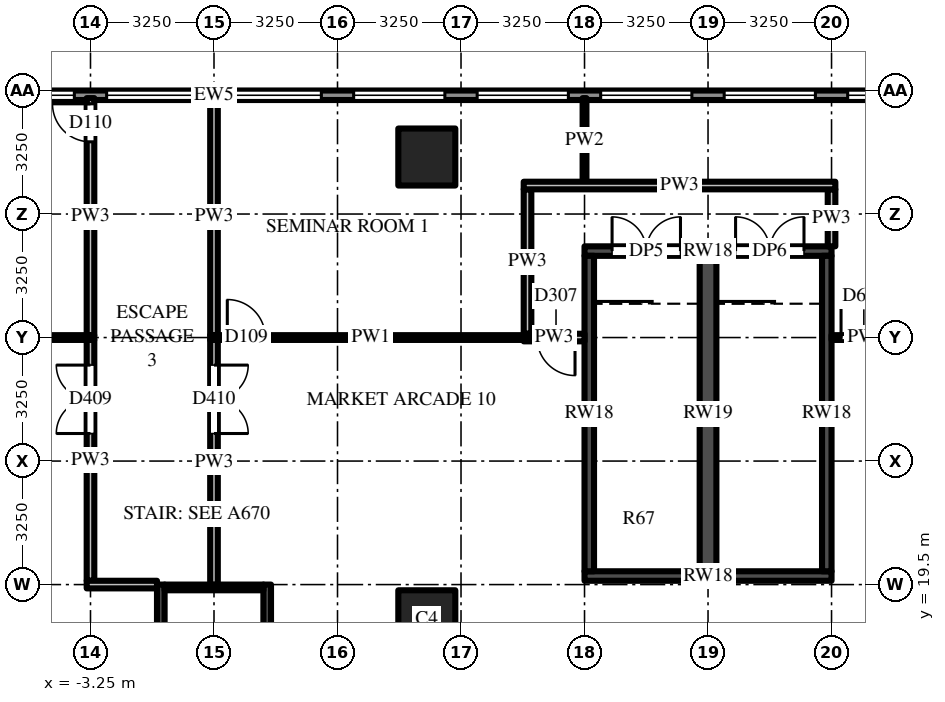
"""IFC4 building model, lengths in metres.
Left out: names, types, materials, properties, quantities, classifications, styles, units other than length and angle.
Written with IfcOpenShell. Run it as: python <this file> out.ifc"""

import sys

from ifc_helpers import new_model, si_unit, direction, frame, frame_2d, origin, origin_2d, place, context, subcontext, project, spatial, rectangle, extrude, source, transform, mapped, element, fill, save


model = new_model("IFC4")
c1 = context("Model", 3, precision=1e-05, world=origin(), true_north=direction((0.0, 1.0)))
c2 = subcontext(c1, "Body", "Model", "MODEL_VIEW")
j1 = project(units=[si_unit("LENGTHUNIT", "METRE"), si_unit("PLANEANGLEUNIT", "RADIAN")], contexts=[c1])
p1 = place(None, origin())
s1 = spatial("IfcSite", under=j1, at=p1, CompositionType="ELEMENT")
p2 = place(p1, origin())
s2 = spatial("IfcBuilding", under=s1, at=p2, CompositionType="ELEMENT")
p3 = place(p2, frame((0.0, 0.0, 29.0)))
s3 = spatial("IfcBuildingStorey", under=s2, at=p3, CompositionType="ELEMENT", Elevation=29.0)
m1 = source(origin(), c2, "Body", "SweptSolid", [
    extrude(rectangle(XDim=1.5, YDim=1.5, at=origin_2d()), origin(), (0.0, 0.0, 1.0), 5.0),
])
for number, where, z_axis, x_axis in (
    (1, (5.6, 18.6, 0.0), (0.0, 0.0, 1.0), (1.0, 0.0, 0.0)),
    (2, (5.6, 30.75, 0.0), (0.0, 0.0, 1.0), (1.0, 0.0, 0.0)),
):
    element("IfcColumn", number, at=place(p3, frame(where, z_axis=z_axis, x_axis=x_axis)), inside=s3, PredefinedType="COLUMN", context=c2, shape_type="MappedRepresentation", body=[
        mapped(m1, transform((0.0, 0.0, 0.0))),
    ])
m2 = source(origin(), c2, "Body", "SweptSolid", [
    extrude(rectangle(XDim=6.0, YDim=0.2, at=frame_2d((3.0, 0.0))), origin(), (0.0, 0.0, 1.0), 4.65),
])
for number, where, z_axis, x_axis in (
    (3, (-1.4, 13.5, 0.0), (0.0, 0.0, 1.0), (0.0, 1.0, 0.0)),
    (4, (1.4, 13.5, 0.0), (0.0, 0.0, 1.0), (0.0, 1.0, 0.0)),
):
    element("IfcWall", number, at=place(p3, frame(where, z_axis=z_axis, x_axis=x_axis)), inside=s3, PredefinedType="SHEAR", context=c2, shape_type="MappedRepresentation", body=[
        mapped(m2, transform((0.0, 0.0, 0.0))),
    ])
m3 = source(origin(), c2, "Body", "SweptSolid", [
    extrude(rectangle(XDim=2.6, YDim=0.15, at=frame_2d((1.3, 0.0))), origin(), (0.0, 0.0, 1.0), 4.65),
])
p4 = place(p3, frame((-1.3, 19.425, 0.0), z_axis=(0.0, 0.0, 1.0), x_axis=(1.0, 0.0, 0.0)))
e5 = element("IfcWall", 5, at=p4, inside=s3, PredefinedType="SHEAR", context=c2, shape_type="MappedRepresentation", body=[
    mapped(m3, transform((0.0, 0.0, 0.0))),
])
m4 = source(origin(), c2, "Body", "SweptSolid", [
    extrude(rectangle(XDim=6.5, YDim=0.25, at=frame_2d((3.25, 0.0))), origin(), (0.0, 0.0, 1.0), 4.65),
])
p5 = place(p3, frame((9.75, 28.275, 0.0), z_axis=(0.0, 0.0, 1.0), x_axis=(1.0, 0.0, 0.0)))
e6 = element("IfcWall", 6, at=p5, inside=s3, PredefinedType="SHEAR", context=c2, shape_type="MappedRepresentation", body=[
    mapped(m4, transform((0.0, 0.0, 0.0))),
])
m5 = source(origin(), c2, "Body", "SweptSolid", [
    extrude(rectangle(XDim=1.8, YDim=2.1, at=frame_2d((0.9, 1.05))), frame((0.0, 0.135, 0.0), z_axis=(0.0, -1.0, 0.0), x_axis=(1.0, 0.0, 0.0)), (0.0, 0.0, 1.0), 0.27),
])
p6 = place(p5, frame((0.725, 0.0, 0.0)))
e7 = element("IfcOpeningElement", 7, at=p6, cuts=e6, PredefinedType="OPENING", context=c2, shape_type="MappedRepresentation", body=[
    mapped(m5, transform((0.0, 0.0, 0.0))),
])
p7 = place(p5, frame((3.975, 0.0, 0.0)))
e8 = element("IfcOpeningElement", 8, at=p7, cuts=e6, PredefinedType="OPENING", context=c2, shape_type="MappedRepresentation", body=[
    mapped(m5, transform((0.0, 0.0, 0.0))),
])
p8 = place(p3, frame((9.75, 19.725, 0.0), z_axis=(0.0, 0.0, 1.0), x_axis=(1.0, 0.0, 0.0)))
e9 = element("IfcWall", 9, at=p8, inside=s3, PredefinedType="SHEAR", context=c2, shape_type="MappedRepresentation", body=[
    mapped(m4, transform((0.0, 0.0, 0.0))),
])
m6 = source(origin(), c2, "Body", "SweptSolid", [
    extrude(rectangle(XDim=8.3, YDim=0.25, at=frame_2d((4.15, 0.0))), origin(), (0.0, 0.0, 1.0), 4.65),
])
for number, where, z_axis, x_axis in (
    (10, (9.875, 19.85, 0.0), (0.0, 0.0, 1.0), (0.0, 1.0, 0.0)),
    (11, (16.125, 19.85, 0.0), (0.0, 0.0, 1.0), (0.0, 1.0, 0.0)),
):
    element("IfcWall", number, at=place(p3, frame(where, z_axis=z_axis, x_axis=x_axis)), inside=s3, PredefinedType="SHEAR", context=c2, shape_type="MappedRepresentation", body=[
        mapped(m6, transform((0.0, 0.0, 0.0))),
    ])
m7 = source(origin(), c2, "Body", "SweptSolid", [
    extrude(rectangle(XDim=8.3, YDim=0.44, at=frame_2d((4.15, 0.0))), origin(), (0.0, 0.0, 1.0), 4.65),
])
p9 = place(p3, frame((13.0, 19.85, 0.0), z_axis=(0.0, 0.0, 1.0), x_axis=(0.0, 1.0, 0.0)))
e12 = element("IfcWall", 12, at=p9, inside=s3, PredefinedType="SHEAR", context=c2, shape_type="MappedRepresentation", body=[
    mapped(m7, transform((0.0, 0.0, 0.0))),
])
m8 = source(origin(), c2, "Body", "SweptSolid", [
    extrude(rectangle(XDim=58.5, YDim=0.25, at=frame_2d((29.25, 0.0))), origin(), (0.0, 0.0, 1.0), 4.65),
])
p10 = place(p3, frame((29.25, 32.375, 0.0), z_axis=(0.0, 0.0, 1.0), x_axis=(-1.0, 0.0, 0.0)))
e13 = element("IfcWall", 13, at=p10, inside=s3, PredefinedType="SOLIDWALL", context=c2, shape_type="MappedRepresentation", body=[
    mapped(m8, transform((0.0, 0.0, 0.0))),
])
m9 = source(origin(), c2, "Body", "SweptSolid", [
    extrude(rectangle(XDim=2.4, YDim=3.3, at=frame_2d((1.2, 1.65))), frame((0.0, 0.135, 0.0), z_axis=(0.0, -1.0, 0.0), x_axis=(1.0, 0.0, 0.0)), (0.0, 0.0, 1.0), 0.27),
])
p11 = place(p10, frame((0.425, 0.0, 0.6)))
e14 = element("IfcOpeningElement", 14, at=p11, cuts=e13, PredefinedType="OPENING", context=c2, shape_type="MappedRepresentation", body=[
    mapped(m9, transform((0.0, 0.0, 0.0))),
])
p12 = place(p10, frame((3.675, 0.0, 0.6)))
e15 = element("IfcOpeningElement", 15, at=p12, cuts=e13, PredefinedType="OPENING", context=c2, shape_type="MappedRepresentation", body=[
    mapped(m9, transform((0.0, 0.0, 0.0))),
])
p13 = place(p10, frame((6.925, 0.0, 0.6)))
e16 = element("IfcOpeningElement", 16, at=p13, cuts=e13, PredefinedType="OPENING", context=c2, shape_type="MappedRepresentation", body=[
    mapped(m9, transform((0.0, 0.0, 0.0))),
])
p14 = place(p10, frame((10.175, 0.0, 0.6)))
e17 = element("IfcOpeningElement", 17, at=p14, cuts=e13, PredefinedType="OPENING", context=c2, shape_type="MappedRepresentation", body=[
    mapped(m9, transform((0.0, 0.0, 0.0))),
])
p15 = place(p10, frame((13.425, 0.0, 0.6)))
e18 = element("IfcOpeningElement", 18, at=p15, cuts=e13, PredefinedType="OPENING", context=c2, shape_type="MappedRepresentation", body=[
    mapped(m9, transform((0.0, 0.0, 0.0))),
])
p16 = place(p10, frame((16.675, 0.0, 0.6)))
e19 = element("IfcOpeningElement", 19, at=p16, cuts=e13, PredefinedType="OPENING", context=c2, shape_type="MappedRepresentation", body=[
    mapped(m9, transform((0.0, 0.0, 0.0))),
])
p17 = place(p10, frame((19.925, 0.0, 0.6)))
e20 = element("IfcOpeningElement", 20, at=p17, cuts=e13, PredefinedType="OPENING", context=c2, shape_type="MappedRepresentation", body=[
    mapped(m9, transform((0.0, 0.0, 0.0))),
])
p18 = place(p10, frame((23.175, 0.0, 0.6)))
e21 = element("IfcOpeningElement", 21, at=p18, cuts=e13, PredefinedType="OPENING", context=c2, shape_type="MappedRepresentation", body=[
    mapped(m9, transform((0.0, 0.0, 0.0))),
])
p19 = place(p10, frame((26.425, 0.0, 0.6)))
e22 = element("IfcOpeningElement", 22, at=p19, cuts=e13, PredefinedType="OPENING", context=c2, shape_type="MappedRepresentation", body=[
    mapped(m9, transform((0.0, 0.0, 0.0))),
])
p20 = place(p10, frame((29.675, 0.0, 0.6)))
e23 = element("IfcOpeningElement", 23, at=p20, cuts=e13, PredefinedType="OPENING", context=c2, shape_type="MappedRepresentation", body=[
    mapped(m9, transform((0.0, 0.0, 0.0))),
])
p21 = place(p10, frame((32.925, 0.0, 0.6)))
e24 = element("IfcOpeningElement", 24, at=p21, cuts=e13, PredefinedType="OPENING", context=c2, shape_type="MappedRepresentation", body=[
    mapped(m9, transform((0.0, 0.0, 0.0))),
])
p22 = place(p10, frame((36.175, 0.0, 0.6)))
e25 = element("IfcOpeningElement", 25, at=p22, cuts=e13, PredefinedType="OPENING", context=c2, shape_type="MappedRepresentation", body=[
    mapped(m9, transform((0.0, 0.0, 0.0))),
])
p23 = place(p10, frame((39.425, 0.0, 0.6)))
e26 = element("IfcOpeningElement", 26, at=p23, cuts=e13, PredefinedType="OPENING", context=c2, shape_type="MappedRepresentation", body=[
    mapped(m9, transform((0.0, 0.0, 0.0))),
])
p24 = place(p10, frame((42.675, 0.0, 0.6)))
e27 = element("IfcOpeningElement", 27, at=p24, cuts=e13, PredefinedType="OPENING", context=c2, shape_type="MappedRepresentation", body=[
    mapped(m9, transform((0.0, 0.0, 0.0))),
])
p25 = place(p10, frame((45.925, 0.0, 0.6)))
e28 = element("IfcOpeningElement", 28, at=p25, cuts=e13, PredefinedType="OPENING", context=c2, shape_type="MappedRepresentation", body=[
    mapped(m9, transform((0.0, 0.0, 0.0))),
])
p26 = place(p10, frame((49.175, 0.0, 0.6)))
e29 = element("IfcOpeningElement", 29, at=p26, cuts=e13, PredefinedType="OPENING", context=c2, shape_type="MappedRepresentation", body=[
    mapped(m9, transform((0.0, 0.0, 0.0))),
])
p27 = place(p10, frame((52.425, 0.0, 0.6)))
e30 = element("IfcOpeningElement", 30, at=p27, cuts=e13, PredefinedType="OPENING", context=c2, shape_type="MappedRepresentation", body=[
    mapped(m9, transform((0.0, 0.0, 0.0))),
])
p28 = place(p10, frame((55.675, 0.0, 0.6)))
e31 = element("IfcOpeningElement", 31, at=p28, cuts=e13, PredefinedType="OPENING", context=c2, shape_type="MappedRepresentation", body=[
    mapped(m9, transform((0.0, 0.0, 0.0))),
])
m10 = source(origin(), c2, "Body", "SweptSolid", [
    extrude(rectangle(XDim=3.188, YDim=0.2, at=frame_2d((1.594, 0.0))), origin(), (0.0, 0.0, 1.0), 4.65),
])
p29 = place(p3, frame((-3.25, 22.75, 0.0), z_axis=(0.0, 0.0, 1.0), x_axis=(0.0, 1.0, 0.0)))
e32 = element("IfcWall", 32, at=p29, inside=s3, PredefinedType="PARTITIONING", context=c2, shape_type="MappedRepresentation", body=[
    mapped(m10, transform((0.0, 0.0, 0.0))),
])
m11 = source(origin(), c2, "Body", "SweptSolid", [
    extrude(rectangle(XDim=1.8, YDim=2.1, at=frame_2d((0.9, 1.05))), frame((0.0, 0.11, 0.0), z_axis=(0.0, -1.0, 0.0), x_axis=(1.0, 0.0, 0.0)), (0.0, 0.0, 1.0), 0.22),
])
p30 = place(p29, frame((0.725, 0.0, 0.0)))
e33 = element("IfcOpeningElement", 33, at=p30, cuts=e32, PredefinedType="OPENING", context=c2, shape_type="MappedRepresentation", body=[
    mapped(m11, transform((0.0, 0.0, 0.0))),
])
m12 = source(origin(), c2, "Body", "SweptSolid", [
    extrude(rectangle(XDim=3.15, YDim=0.2, at=frame_2d((1.575, 0.0))), origin(), (0.0, 0.0, 1.0), 4.65),
])
p31 = place(p3, frame((-3.25, 19.6, 0.0), z_axis=(0.0, 0.0, 1.0), x_axis=(0.0, 1.0, 0.0)))
e34 = element("IfcWall", 34, at=p31, inside=s3, PredefinedType="PARTITIONING", context=c2, shape_type="MappedRepresentation", body=[
    mapped(m12, transform((0.0, 0.0, 0.0))),
])
m13 = source(origin(), c2, "Body", "SweptSolid", [
    extrude(rectangle(XDim=6.238, YDim=0.2, at=frame_2d((3.119, 0.0))), origin(), (0.0, 0.0, 1.0), 3.73),
])
p32 = place(p3, frame((-3.25, 26.062, 0.0), z_axis=(0.0, 0.0, 1.0), x_axis=(0.0, 1.0, 0.0)))
e35 = element("IfcWall", 35, at=p32, inside=s3, PredefinedType="PARTITIONING", context=c2, shape_type="MappedRepresentation", body=[
    mapped(m13, transform((0.0, 0.0, 0.0))),
])
m14 = source(origin(), c2, "Body", "SweptSolid", [
    extrude(rectangle(XDim=1.0, YDim=2.1, at=frame_2d((0.5, 1.05))), frame((0.0, 0.11, 0.0), z_axis=(0.0, -1.0, 0.0), x_axis=(1.0, 0.0, 0.0)), (0.0, 0.0, 1.0), 0.22),
])
p33 = place(p32, frame((5.087, 0.0, 0.0)))
e36 = element("IfcOpeningElement", 36, at=p33, cuts=e35, PredefinedType="OPENING", context=c2, shape_type="MappedRepresentation", body=[
    mapped(m14, transform((0.0, 0.0, 0.0))),
])
m15 = source(origin(), c2, "Body", "SweptSolid", [
    extrude(rectangle(XDim=3.188, YDim=0.2, at=frame_2d((1.594, 0.0))), origin(), (0.0, 0.0, 1.0), 3.947),
])
p34 = place(p3, frame((0.0, 25.938, 0.0), z_axis=(0.0, 0.0, 1.0), x_axis=(0.0, -1.0, 0.0)))
e37 = element("IfcWall", 37, at=p34, inside=s3, PredefinedType="PARTITIONING", context=c2, shape_type="MappedRepresentation", body=[
    mapped(m15, transform((0.0, 0.0, 0.0))),
])
p35 = place(p34, frame((0.663, 0.0, 0.0)))
e38 = element("IfcOpeningElement", 38, at=p35, cuts=e37, PredefinedType="OPENING", context=c2, shape_type="MappedRepresentation", body=[
    mapped(m11, transform((0.0, 0.0, 0.0))),
])
p36 = place(p3, frame((0.0, 32.3, 0.0), z_axis=(0.0, 0.0, 1.0), x_axis=(0.0, -1.0, 0.0)))
e39 = element("IfcWall", 39, at=p36, inside=s3, PredefinedType="PARTITIONING", context=c2, shape_type="MappedRepresentation", body=[
    mapped(m13, transform((0.0, 0.0, 0.0))),
])
m16 = source(origin(), c2, "Body", "SweptSolid", [
    extrude(rectangle(XDim=3.25, YDim=0.2, at=frame_2d((1.625, 0.0))), origin(), (0.0, 0.0, 1.0), 3.947),
])
p37 = place(p3, frame((0.0, 19.5, 0.0), z_axis=(0.0, 0.0, 1.0), x_axis=(0.0, 1.0, 0.0)))
e40 = element("IfcWall", 40, at=p37, inside=s3, PredefinedType="PARTITIONING", context=c2, shape_type="MappedRepresentation", body=[
    mapped(m16, transform((0.0, 0.0, 0.0))),
])
m17 = source(origin(), c2, "Body", "SweptSolid", [
    extrude(rectangle(XDim=3.8, YDim=0.2, at=frame_2d((1.9, 0.0))), origin(), (0.0, 0.0, 1.0), 4.224),
])
p38 = place(p3, frame((8.25, 26.1, 0.0), z_axis=(0.0, 0.0, 1.0), x_axis=(0.0, 1.0, 0.0)))
e41 = element("IfcWall", 41, at=p38, inside=s3, PredefinedType="PARTITIONING", context=c2, shape_type="MappedRepresentation", body=[
    mapped(m17, transform((0.0, 0.0, 0.0))),
])
m18 = source(origin(), c2, "Body", "SweptSolid", [
    extrude(rectangle(XDim=2.2, YDim=0.1, at=frame_2d((1.1, 0.0))), origin(), (0.0, 0.0, 1.0), 3.73),
])
p39 = place(p3, frame((9.75, 30.1, 0.0), z_axis=(0.0, 0.0, 1.0), x_axis=(0.0, 1.0, 0.0)))
e42 = element("IfcWall", 42, at=p39, inside=s3, PredefinedType="PARTITIONING", context=c2, shape_type="MappedRepresentation", body=[
    mapped(m18, transform((0.0, 0.0, 0.0))),
])
m19 = source(origin(), c2, "Body", "SweptSolid", [
    extrude(rectangle(XDim=1.5, YDim=0.2, at=frame_2d((0.75, 0.0))), origin(), (0.0, 0.0, 1.0), 4.65),
])
p40 = place(p3, frame((16.25, 29.9, 0.0), z_axis=(0.0, 0.0, 1.0), x_axis=(0.0, -1.0, 0.0)))
e43 = element("IfcWall", 43, at=p40, inside=s3, PredefinedType="PARTITIONING", context=c2, shape_type="MappedRepresentation", body=[
    mapped(m19, transform((0.0, 0.0, 0.0))),
])
m20 = source(origin(), c2, "Body", "SweptSolid", [
    extrude(rectangle(XDim=1.85, YDim=0.2, at=frame_2d((0.925, 0.0))), origin(), (0.0, 0.0, 1.0), 3.947),
])
p41 = place(p3, frame((-1.5, 19.5, 0.0), z_axis=(0.0, 0.0, 1.0), x_axis=(-1.0, 0.0, 0.0)))
e44 = element("IfcWall", 44, at=p41, inside=s3, PredefinedType="PARTITIONING", context=c2, shape_type="MappedRepresentation", body=[
    mapped(m20, transform((0.0, 0.0, 0.0))),
])
m21 = source(origin(), c2, "Body", "SweptSolid", [
    extrude(rectangle(XDim=1.6, YDim=0.2, at=frame_2d((0.8, 0.0))), origin(), (0.0, 0.0, 1.0), 4.65),
])
p42 = place(p3, frame((9.75, 26.0, 0.0), z_axis=(0.0, 0.0, 1.0), x_axis=(-1.0, 0.0, 0.0)))
e45 = element("IfcWall", 45, at=p42, inside=s3, PredefinedType="PARTITIONING", context=c2, shape_type="MappedRepresentation", body=[
    mapped(m21, transform((0.0, 0.0, 0.0))),
])
p43 = place(p42, frame((0.25, 0.0, 0.0)))
e46 = element("IfcOpeningElement", 46, at=p43, cuts=e45, PredefinedType="OPENING", context=c2, shape_type="MappedRepresentation", body=[
    mapped(m14, transform((0.0, 0.0, 0.0))),
])
m22 = source(origin(), c2, "Body", "SweptSolid", [
    extrude(rectangle(XDim=5.2, YDim=0.125, at=frame_2d((2.6, 0.0))), origin(), (0.0, 0.0, 1.0), 2.83),
])
p44 = place(p3, frame((-8.35, 26.0, 0.0), z_axis=(0.0, 0.0, 1.0), x_axis=(1.0, 0.0, 0.0)))
e47 = element("IfcWall", 47, at=p44, inside=s3, PredefinedType="PARTITIONING", context=c2, shape_type="MappedRepresentation", body=[
    mapped(m22, transform((0.0, 0.0, 0.0))),
])
m23 = source(origin(), c2, "Body", "SweptSolid", [
    extrude(rectangle(XDim=8.45, YDim=0.125, at=frame_2d((4.225, 0.0))), origin(), (0.0, 0.0, 1.0), 2.83),
])
p45 = place(p3, frame((-0.1, 26.0, 0.0), z_axis=(0.0, 0.0, 1.0), x_axis=(1.0, 0.0, 0.0)))
e48 = element("IfcWall", 48, at=p45, inside=s3, PredefinedType="PARTITIONING", context=c2, shape_type="MappedRepresentation", body=[
    mapped(m23, transform((0.0, 0.0, 0.0))),
])
m24 = source(origin(), c2, "Body", "SweptSolid", [
    extrude(rectangle(XDim=1.0, YDim=2.1, at=frame_2d((0.5, 1.05))), frame((0.0, 0.073, 0.0), z_axis=(0.0, -1.0, 0.0), x_axis=(1.0, 0.0, 0.0)), (0.0, 0.0, 1.0), 0.145),
])
p46 = place(p45, frame((0.45, 0.0, 0.0)))
e49 = element("IfcOpeningElement", 49, at=p46, cuts=e48, PredefinedType="OPENING", context=c2, shape_type="MappedRepresentation", body=[
    mapped(m24, transform((0.0, 0.0, 0.0))),
])
m25 = source(origin(), c2, "Body", "SweptSolid", [
    extrude(rectangle(XDim=1.85, YDim=0.125, at=frame_2d((0.925, 0.0))), origin(), (0.0, 0.0, 1.0), 4.65),
])
p47 = place(p3, frame((16.25, 26.0, 0.0), z_axis=(0.0, 0.0, 1.0), x_axis=(1.0, 0.0, 0.0)))
e50 = element("IfcWall", 50, at=p47, inside=s3, PredefinedType="PARTITIONING", context=c2, shape_type="MappedRepresentation", body=[
    mapped(m25, transform((0.0, 0.0, 0.0))),
])
m26 = source(origin(), c2, "Body", "SweptSolid", [
    extrude(rectangle(XDim=1.2, YDim=2.1, at=frame_2d((0.6, 1.05))), frame((0.0, 0.073, 0.0), z_axis=(0.0, -1.0, 0.0), x_axis=(1.0, 0.0, 0.0)), (0.0, 0.0, 1.0), 0.145),
])
p48 = place(p47, frame((0.25, 0.0, 0.0)))
e51 = element("IfcOpeningElement", 51, at=p48, cuts=e50, PredefinedType="OPENING", context=c2, shape_type="MappedRepresentation", body=[
    mapped(m26, transform((0.0, 0.0, 0.0))),
])
m27 = source(origin(), c2, "Body", "SweptSolid", [
    extrude(rectangle(XDim=8.2, YDim=0.2, at=frame_2d((4.1, 0.0))), origin(), (0.0, 0.0, 1.0), 4.65),
])
p49 = place(p3, frame((16.35, 30.0, 0.0), z_axis=(0.0, 0.0, 1.0), x_axis=(-1.0, 0.0, 0.0)))
e52 = element("IfcWall", 52, at=p49, inside=s3, PredefinedType="PARTITIONING", context=c2, shape_type="MappedRepresentation", body=[
    mapped(m27, transform((0.0, 0.0, 0.0))),
])
m28 = source(origin(), c2, "Body", "SweptSolid", [
    extrude(rectangle(XDim=1.8, YDim=2.1, at=frame_2d((0.9, 1.05))), frame((0.0, 0.025, 0.0), z_axis=(0.0, -1.0, 0.0), x_axis=(1.0, 0.0, 0.0)), (0.0, 0.0, 1.0), 0.05),
])
p50 = place(p6, origin())
e53 = element("IfcDoor", 53, at=p50, inside=s3, OperationType="DOUBLE_DOOR_SINGLE_SWING", PredefinedType="DOOR", context=c2, shape_type="MappedRepresentation", body=[
    mapped(m28, transform((0.0, 0.0, 0.0))),
])
fill(e7, e53)
p51 = place(p7, origin())
e54 = element("IfcDoor", 54, at=p51, inside=s3, OperationType="DOUBLE_DOOR_SINGLE_SWING", PredefinedType="DOOR", context=c2, shape_type="MappedRepresentation", body=[
    mapped(m28, transform((0.0, 0.0, 0.0))),
])
fill(e8, e54)
m29 = source(origin(), c2, "Body", "SweptSolid", [
    extrude(rectangle(XDim=2.4, YDim=3.3, at=frame_2d((1.2, 1.65))), frame((0.0, 0.03, 0.0), z_axis=(0.0, -1.0, 0.0), x_axis=(1.0, 0.0, 0.0)), (0.0, 0.0, 1.0), 0.06),
])
p52 = place(p14, origin())
e55 = element("IfcWindow", 55, at=p52, inside=s3, PartitioningType="SINGLE_PANEL", PredefinedType="WINDOW", context=c2, shape_type="MappedRepresentation", body=[
    mapped(m29, transform((0.0, 0.0, 0.0))),
])
fill(e17, e55)
p53 = place(p15, origin())
e56 = element("IfcWindow", 56, at=p53, inside=s3, PartitioningType="SINGLE_PANEL", PredefinedType="WINDOW", context=c2, shape_type="MappedRepresentation", body=[
    mapped(m29, transform((0.0, 0.0, 0.0))),
])
fill(e18, e56)
p54 = place(p16, origin())
e57 = element("IfcWindow", 57, at=p54, inside=s3, PartitioningType="SINGLE_PANEL", PredefinedType="WINDOW", context=c2, shape_type="MappedRepresentation", body=[
    mapped(m29, transform((0.0, 0.0, 0.0))),
])
fill(e19, e57)
p55 = place(p17, origin())
e58 = element("IfcWindow", 58, at=p55, inside=s3, PartitioningType="SINGLE_PANEL", PredefinedType="WINDOW", context=c2, shape_type="MappedRepresentation", body=[
    mapped(m29, transform((0.0, 0.0, 0.0))),
])
fill(e20, e58)
p56 = place(p18, origin())
e59 = element("IfcWindow", 59, at=p56, inside=s3, PartitioningType="SINGLE_PANEL", PredefinedType="WINDOW", context=c2, shape_type="MappedRepresentation", body=[
    mapped(m29, transform((0.0, 0.0, 0.0))),
])
fill(e21, e59)
p57 = place(p19, origin())
e60 = element("IfcWindow", 60, at=p57, inside=s3, PartitioningType="SINGLE_PANEL", PredefinedType="WINDOW", context=c2, shape_type="MappedRepresentation", body=[
    mapped(m29, transform((0.0, 0.0, 0.0))),
])
fill(e22, e60)
p58 = place(p20, origin())
e61 = element("IfcWindow", 61, at=p58, inside=s3, PartitioningType="SINGLE_PANEL", PredefinedType="WINDOW", context=c2, shape_type="MappedRepresentation", body=[
    mapped(m29, transform((0.0, 0.0, 0.0))),
])
fill(e23, e61)
p59 = place(p21, origin())
e62 = element("IfcWindow", 62, at=p59, inside=s3, PartitioningType="SINGLE_PANEL", PredefinedType="WINDOW", context=c2, shape_type="MappedRepresentation", body=[
    mapped(m29, transform((0.0, 0.0, 0.0))),
])
fill(e24, e62)
p60 = place(p30, origin())
e63 = element("IfcDoor", 63, at=p60, inside=s3, OperationType="DOUBLE_DOOR_SINGLE_SWING", PredefinedType="DOOR", context=c2, shape_type="MappedRepresentation", body=[
    mapped(m28, transform((0.0, 0.0, 0.0))),
])
fill(e33, e63)
p61 = place(p35, origin())
e64 = element("IfcDoor", 64, at=p61, inside=s3, OperationType="DOUBLE_DOOR_SINGLE_SWING", PredefinedType="DOOR", context=c2, shape_type="MappedRepresentation", body=[
    mapped(m28, transform((0.0, 0.0, 0.0))),
])
fill(e38, e64)
m30 = source(origin(), c2, "Body", "SweptSolid", [
    extrude(rectangle(XDim=1.0, YDim=2.1, at=frame_2d((0.5, 1.05))), frame((0.0, 0.025, 0.0), z_axis=(0.0, -1.0, 0.0), x_axis=(1.0, 0.0, 0.0)), (0.0, 0.0, 1.0), 0.05),
])
p62 = place(p46, origin())
e65 = element("IfcDoor", 65, at=p62, inside=s3, OperationType="SINGLE_SWING_LEFT", PredefinedType="DOOR", context=c2, shape_type="MappedRepresentation", body=[
    mapped(m30, transform((0.0, 0.0, 0.0))),
])
fill(e49, e65)
p63 = place(p43, origin())
e66 = element("IfcDoor", 66, at=p63, inside=s3, OperationType="SINGLE_SWING_LEFT", PredefinedType="DOOR", context=c2, shape_type="MappedRepresentation", body=[
    mapped(m30, transform((0.0, 0.0, 0.0))),
])
fill(e46, e66)
m31 = source(origin(), c2, "Body", "SweptSolid", [
    extrude(rectangle(XDim=1.2, YDim=2.1, at=frame_2d((0.6, 1.05))), frame((0.0, 0.025, 0.0), z_axis=(0.0, -1.0, 0.0), x_axis=(1.0, 0.0, 0.0)), (0.0, 0.0, 1.0), 0.05),
])
p64 = place(p48, origin())
e67 = element("IfcDoor", 67, at=p64, inside=s3, OperationType="SINGLE_SWING_LEFT", PredefinedType="DOOR", context=c2, shape_type="MappedRepresentation", body=[
    mapped(m31, transform((0.0, 0.0, 0.0))),
])
fill(e51, e67)
p65 = place(p33, origin())
e68 = element("IfcDoor", 68, at=p65, inside=s3, OperationType="SINGLE_SWING_RIGHT", PredefinedType="DOOR", context=c2, shape_type="MappedRepresentation", body=[
    mapped(m30, transform((0.0, 0.0, 0.0))),
])
fill(e36, e68)
save(model, sys.argv[1])
